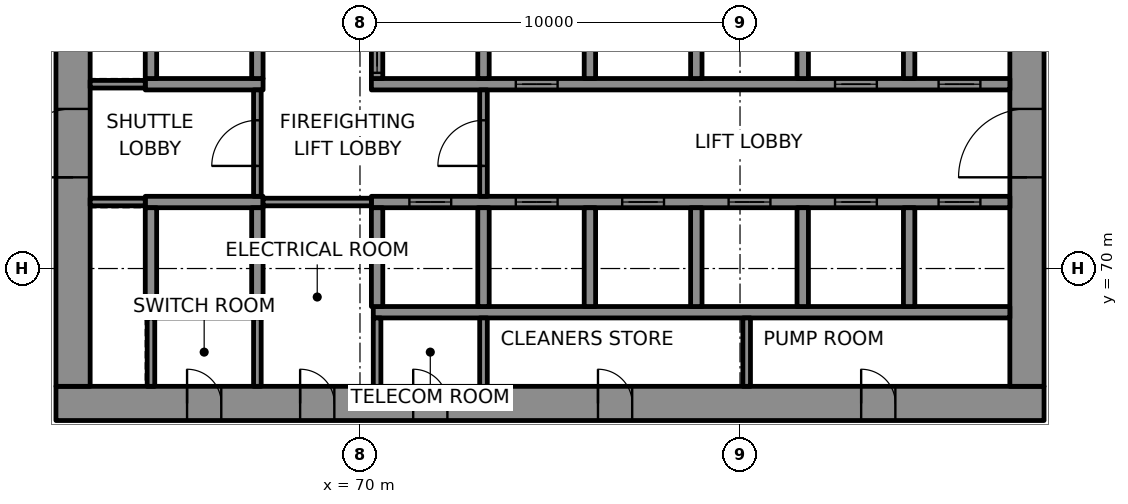
"""IFC4 building model, lengths in metres.
Left out: names, types, materials, properties, quantities, classifications, styles, units other than length and angle.
Written with IfcOpenShell. Run it as: python <this file> out.ifc"""

import sys

from ifc_helpers import new_model, si_unit, direction, frame, frame_2d, origin, place, context, subcontext, project, spatial, rectangle, extrude, element, fill, save


model = new_model("IFC4")
c1 = context("Model", 3, precision=1e-05, world=origin(), true_north=direction((0.0, 1.0)))
c2 = subcontext(c1, "Body", "Model", "MODEL_VIEW")
j1 = project(units=[si_unit("LENGTHUNIT", "METRE"), si_unit("PLANEANGLEUNIT", "RADIAN")], contexts=[c1])
p1 = place(None, origin())
s1 = spatial("IfcSite", under=j1, at=p1, CompositionType="ELEMENT")
p2 = place(p1, origin())
s2 = spatial("IfcBuilding", under=s1, at=p2, CompositionType="ELEMENT")
p3 = place(p2, frame((0.0, 0.0, 86.2)))
s3 = spatial("IfcBuildingStorey", under=s2, at=p3, CompositionType="ELEMENT", Elevation=86.2)
p4 = place(p3, frame((62.0, 66.45, 0.0), z_axis=(0.0, 0.0, 1.0), x_axis=(1.0, 0.0, 0.0)))
e1 = element("IfcWall", 1, at=p4, inside=s3, PredefinedType="SHEAR", context=c2, shape_type="SweptSolid", body=[
    extrude(rectangle(XDim=26.0, YDim=0.9, at=frame_2d((13.0, 0.0))), origin(), (0.0, 0.0, 1.0), 4.0),
])
p5 = place(p4, frame((3.45, 0.0, 0.0)))
e2 = element("IfcOpeningElement", 2, at=p5, cuts=e1, PredefinedType="OPENING", context=c2, shape_type="SweptSolid", body=[
    extrude(rectangle(XDim=0.9, YDim=2.1, at=frame_2d((0.45, 1.05))), frame((0.0, 0.46, 0.0), z_axis=(0.0, -1.0, 0.0), x_axis=(1.0, 0.0, 0.0)), (0.0, 0.0, 1.0), 0.92),
])
p6 = place(p4, frame((6.425, 0.0, 0.0)))
e3 = element("IfcOpeningElement", 3, at=p6, cuts=e1, PredefinedType="OPENING", context=c2, shape_type="SweptSolid", body=[
    extrude(rectangle(XDim=0.9, YDim=2.1, at=frame_2d((0.45, 1.05))), frame((0.0, 0.46, 0.0), z_axis=(0.0, -1.0, 0.0), x_axis=(1.0, 0.0, 0.0)), (0.0, 0.0, 1.0), 0.92),
])
p7 = place(p4, frame((9.4, 0.0, 0.0)))
e4 = element("IfcOpeningElement", 4, at=p7, cuts=e1, PredefinedType="OPENING", context=c2, shape_type="SweptSolid", body=[
    extrude(rectangle(XDim=0.9, YDim=2.1, at=frame_2d((0.45, 1.05))), frame((0.0, 0.46, 0.0), z_axis=(0.0, -1.0, 0.0), x_axis=(1.0, 0.0, 0.0)), (0.0, 0.0, 1.0), 0.92),
])
p8 = place(p4, frame((14.262, 0.0, 0.0)))
e5 = element("IfcOpeningElement", 5, at=p8, cuts=e1, PredefinedType="OPENING", context=c2, shape_type="SweptSolid", body=[
    extrude(rectangle(XDim=0.9, YDim=2.1, at=frame_2d((0.45, 1.05))), frame((0.0, 0.46, 0.0), z_axis=(0.0, -1.0, 0.0), x_axis=(1.0, 0.0, 0.0)), (0.0, 0.0, 1.0), 0.92),
])
p9 = place(p4, frame((21.188, 0.0, 0.0)))
e6 = element("IfcOpeningElement", 6, at=p9, cuts=e1, PredefinedType="OPENING", context=c2, shape_type="SweptSolid", body=[
    extrude(rectangle(XDim=0.9, YDim=2.1, at=frame_2d((0.45, 1.05))), frame((0.0, 0.46, 0.0), z_axis=(0.0, -1.0, 0.0), x_axis=(1.0, 0.0, 0.0)), (0.0, 0.0, 1.0), 0.92),
])
p10 = place(p3, frame((62.45, 66.9, 0.0), z_axis=(0.0, 0.0, 1.0), x_axis=(0.0, 1.0, 0.0)))
e7 = element("IfcWall", 7, at=p10, inside=s3, PredefinedType="SHEAR", context=c2, shape_type="SweptSolid", body=[
    extrude(rectangle(XDim=16.2, YDim=0.9, at=frame_2d((8.1, 0.0))), origin(), (0.0, 0.0, 1.0), 4.0),
])
p11 = place(p10, frame((5.5, 0.0, 0.0)))
e8 = element("IfcOpeningElement", 8, at=p11, cuts=e7, PredefinedType="OPENING", context=c2, shape_type="SweptSolid", body=[
    extrude(rectangle(XDim=1.8, YDim=2.1, at=frame_2d((0.9, 1.05))), frame((0.0, 0.46, 0.0), z_axis=(0.0, -1.0, 0.0), x_axis=(1.0, 0.0, 0.0)), (0.0, 0.0, 1.0), 0.92),
])
p12 = place(p3, frame((87.55, 66.9, 0.0), z_axis=(0.0, 0.0, 1.0), x_axis=(0.0, 1.0, 0.0)))
e9 = element("IfcWall", 9, at=p12, inside=s3, PredefinedType="SHEAR", context=c2, shape_type="SweptSolid", body=[
    extrude(rectangle(XDim=16.2, YDim=0.9, at=frame_2d((8.1, 0.0))), origin(), (0.0, 0.0, 1.0), 4.0),
])
p13 = place(p12, frame((5.5, 0.0, 0.0)))
e10 = element("IfcOpeningElement", 10, at=p13, cuts=e9, PredefinedType="OPENING", context=c2, shape_type="SweptSolid", body=[
    extrude(rectangle(XDim=1.8, YDim=2.1, at=frame_2d((0.9, 1.05))), frame((0.0, 0.46, 0.0), z_axis=(0.0, -1.0, 0.0), x_axis=(1.0, 0.0, 0.0)), (0.0, 0.0, 1.0), 0.92),
])
p14 = place(p12, frame((11.738, 0.0, 0.0)))
e11 = element("IfcOpeningElement", 11, at=p14, cuts=e9, PredefinedType="OPENING", context=c2, shape_type="SweptSolid", body=[
    extrude(rectangle(XDim=0.9, YDim=2.1, at=frame_2d((0.45, 1.05))), frame((0.0, 0.46, 0.0), z_axis=(0.0, -1.0, 0.0), x_axis=(1.0, 0.0, 0.0)), (0.0, 0.0, 1.0), 0.92),
])
p15 = place(p3, frame((64.35, 68.85, 0.0), z_axis=(0.0, 0.0, 1.0), x_axis=(1.0, 0.0, 0.0)))
e12 = element("IfcWall", 12, at=p15, inside=s3, PredefinedType="SHEAR", context=c2, shape_type="SweptSolid", body=[
    extrude(rectangle(XDim=3.1, YDim=0.3, at=frame_2d((1.55, 0.0))), origin(), (0.0, 0.0, 1.0), 4.0),
])
p16 = place(p3, frame((70.35, 68.85, 0.0), z_axis=(0.0, 0.0, 1.0), x_axis=(1.0, 0.0, 0.0)))
e13 = element("IfcWall", 13, at=p16, inside=s3, PredefinedType="SHEAR", context=c2, shape_type="SweptSolid", body=[
    extrude(rectangle(XDim=16.75, YDim=0.3, at=frame_2d((8.375, 0.0))), origin(), (0.0, 0.0, 1.0), 4.0),
])
p17 = place(p3, frame((64.35, 71.75, 0.0), z_axis=(0.0, 0.0, 1.0), x_axis=(1.0, 0.0, 0.0)))
e14 = element("IfcWall", 14, at=p17, inside=s3, PredefinedType="SHEAR", context=c2, shape_type="SweptSolid", body=[
    extrude(rectangle(XDim=3.1, YDim=0.3, at=frame_2d((1.55, 0.0))), origin(), (0.0, 0.0, 1.0), 4.0),
])
p18 = place(p3, frame((70.3, 71.75, 0.0), z_axis=(0.0, 0.0, 1.0), x_axis=(1.0, 0.0, 0.0)))
e15 = element("IfcWall", 15, at=p18, inside=s3, PredefinedType="SHEAR", context=c2, shape_type="SweptSolid", body=[
    extrude(rectangle(XDim=16.8, YDim=0.3, at=frame_2d((8.4, 0.0))), origin(), (0.0, 0.0, 1.0), 4.0),
])
p19 = place(p18, frame((1.0, 0.0, 0.0)))
e16 = element("IfcOpeningElement", 16, at=p19, cuts=e15, PredefinedType="OPENING", context=c2, shape_type="SweptSolid", body=[
    extrude(rectangle(XDim=1.1, YDim=2.1, at=frame_2d((0.55, 1.05))), frame((0.0, 0.16, 0.0), z_axis=(0.0, -1.0, 0.0), x_axis=(1.0, 0.0, 0.0)), (0.0, 0.0, 1.0), 0.32),
])
p20 = place(p18, frame((3.8, 0.0, 0.0)))
e17 = element("IfcOpeningElement", 17, at=p20, cuts=e15, PredefinedType="OPENING", context=c2, shape_type="SweptSolid", body=[
    extrude(rectangle(XDim=1.1, YDim=2.1, at=frame_2d((0.55, 1.05))), frame((0.0, 0.16, 0.0), z_axis=(0.0, -1.0, 0.0), x_axis=(1.0, 0.0, 0.0)), (0.0, 0.0, 1.0), 0.32),
])
p21 = place(p18, frame((6.6, 0.0, 0.0)))
e18 = element("IfcOpeningElement", 18, at=p21, cuts=e15, PredefinedType="OPENING", context=c2, shape_type="SweptSolid", body=[
    extrude(rectangle(XDim=1.1, YDim=2.1, at=frame_2d((0.55, 1.05))), frame((0.0, 0.16, 0.0), z_axis=(0.0, -1.0, 0.0), x_axis=(1.0, 0.0, 0.0)), (0.0, 0.0, 1.0), 0.32),
])
p22 = place(p18, frame((9.4, 0.0, 0.0)))
e19 = element("IfcOpeningElement", 19, at=p22, cuts=e15, PredefinedType="OPENING", context=c2, shape_type="SweptSolid", body=[
    extrude(rectangle(XDim=1.1, YDim=2.1, at=frame_2d((0.55, 1.05))), frame((0.0, 0.16, 0.0), z_axis=(0.0, -1.0, 0.0), x_axis=(1.0, 0.0, 0.0)), (0.0, 0.0, 1.0), 0.32),
])
p23 = place(p18, frame((12.2, 0.0, 0.0)))
e20 = element("IfcOpeningElement", 20, at=p23, cuts=e15, PredefinedType="OPENING", context=c2, shape_type="SweptSolid", body=[
    extrude(rectangle(XDim=1.1, YDim=2.1, at=frame_2d((0.55, 1.05))), frame((0.0, 0.16, 0.0), z_axis=(0.0, -1.0, 0.0), x_axis=(1.0, 0.0, 0.0)), (0.0, 0.0, 1.0), 0.32),
])
p24 = place(p18, frame((14.925, 0.0, 0.0)))
e21 = element("IfcOpeningElement", 21, at=p24, cuts=e15, PredefinedType="OPENING", context=c2, shape_type="SweptSolid", body=[
    extrude(rectangle(XDim=1.1, YDim=2.1, at=frame_2d((0.55, 1.05))), frame((0.0, 0.16, 0.0), z_axis=(0.0, -1.0, 0.0), x_axis=(1.0, 0.0, 0.0)), (0.0, 0.0, 1.0), 0.32),
])
p25 = place(p3, frame((64.35, 74.85, 0.0), z_axis=(0.0, 0.0, 1.0), x_axis=(1.0, 0.0, 0.0)))
e22 = element("IfcWall", 22, at=p25, inside=s3, PredefinedType="SHEAR", context=c2, shape_type="SweptSolid", body=[
    extrude(rectangle(XDim=3.1, YDim=0.3, at=frame_2d((1.55, 0.0))), origin(), (0.0, 0.0, 1.0), 4.0),
])
p26 = place(p3, frame((70.3, 74.85, 0.0), z_axis=(0.0, 0.0, 1.0), x_axis=(1.0, 0.0, 0.0)))
e23 = element("IfcWall", 23, at=p26, inside=s3, PredefinedType="SHEAR", context=c2, shape_type="SweptSolid", body=[
    extrude(rectangle(XDim=16.8, YDim=0.3, at=frame_2d((8.4, 0.0))), origin(), (0.0, 0.0, 1.0), 4.0),
])
p27 = place(p26, frame((3.8, 0.0, 0.0)))
e24 = element("IfcOpeningElement", 24, at=p27, cuts=e23, PredefinedType="OPENING", context=c2, shape_type="SweptSolid", body=[
    extrude(rectangle(XDim=1.1, YDim=2.1, at=frame_2d((0.55, 1.05))), frame((0.0, 0.16, 0.0), z_axis=(0.0, -1.0, 0.0), x_axis=(1.0, 0.0, 0.0)), (0.0, 0.0, 1.0), 0.32),
])
p28 = place(p26, frame((12.2, 0.0, 0.0)))
e25 = element("IfcOpeningElement", 25, at=p28, cuts=e23, PredefinedType="OPENING", context=c2, shape_type="SweptSolid", body=[
    extrude(rectangle(XDim=1.1, YDim=2.1, at=frame_2d((0.55, 1.05))), frame((0.0, 0.16, 0.0), z_axis=(0.0, -1.0, 0.0), x_axis=(1.0, 0.0, 0.0)), (0.0, 0.0, 1.0), 0.32),
])
p29 = place(p26, frame((14.925, 0.0, 0.0)))
e26 = element("IfcOpeningElement", 26, at=p29, cuts=e23, PredefinedType="OPENING", context=c2, shape_type="SweptSolid", body=[
    extrude(rectangle(XDim=1.1, YDim=2.1, at=frame_2d((0.55, 1.05))), frame((0.0, 0.16, 0.0), z_axis=(0.0, -1.0, 0.0), x_axis=(1.0, 0.0, 0.0)), (0.0, 0.0, 1.0), 0.32),
])
for number, where, z_axis, x_axis in (
    (27, (64.5, 69.0, 0.0), (0.0, 0.0, 1.0), (0.0, 1.0, 0.0)),
    (28, (64.5, 75.0, 0.0), (0.0, 0.0, 1.0), (0.0, 1.0, 0.0)),
    (29, (67.3, 69.0, 0.0), (0.0, 0.0, 1.0), (0.0, 1.0, 0.0)),
    (30, (67.3, 75.0, 0.0), (0.0, 0.0, 1.0), (0.0, 1.0, 0.0)),
    (31, (70.45, 69.0, 0.0), (0.0, 0.0, 1.0), (0.0, 1.0, 0.0)),
):
    element("IfcWall", number, at=place(p3, frame(where, z_axis=z_axis, x_axis=x_axis)), inside=s3, PredefinedType="SHEAR", context=c2, shape_type="SweptSolid", body=[
        extrude(rectangle(XDim=2.6, YDim=0.3, at=frame_2d((1.3, 0.0))), origin(), (0.0, 0.0, 1.0), 4.0),
    ])
p30 = place(p3, frame((70.45, 75.0, 0.0), z_axis=(0.0, 0.0, 1.0), x_axis=(0.0, 1.0, 0.0)))
e32 = element("IfcWall", 32, at=p30, inside=s3, PredefinedType="SHEAR", context=c2, shape_type="SweptSolid", body=[
    extrude(rectangle(XDim=2.6, YDim=0.3, at=frame_2d((1.3, 0.0))), origin(), (0.0, 0.0, 1.0), 4.0),
])
p31 = place(p30, frame((0.15, 0.0, 0.0)))
e33 = element("IfcOpeningElement", 33, at=p31, cuts=e32, PredefinedType="OPENING", context=c2, shape_type="SweptSolid", body=[
    extrude(rectangle(XDim=1.1, YDim=2.1, at=frame_2d((0.55, 1.05))), frame((0.0, 0.16, 0.0), z_axis=(0.0, -1.0, 0.0), x_axis=(1.0, 0.0, 0.0)), (0.0, 0.0, 1.0), 0.32),
])
for number, where, z_axis, x_axis in (
    (34, (73.25, 69.0, 0.0), (0.0, 0.0, 1.0), (0.0, 1.0, 0.0)),
    (35, (73.25, 75.0, 0.0), (0.0, 0.0, 1.0), (0.0, 1.0, 0.0)),
    (36, (76.05, 69.0, 0.0), (0.0, 0.0, 1.0), (0.0, 1.0, 0.0)),
    (37, (76.05, 75.0, 0.0), (0.0, 0.0, 1.0), (0.0, 1.0, 0.0)),
    (38, (78.85, 69.0, 0.0), (0.0, 0.0, 1.0), (0.0, 1.0, 0.0)),
    (39, (78.85, 75.0, 0.0), (0.0, 0.0, 1.0), (0.0, 1.0, 0.0)),
    (40, (81.65, 69.0, 0.0), (0.0, 0.0, 1.0), (0.0, 1.0, 0.0)),
    (41, (81.65, 75.0, 0.0), (0.0, 0.0, 1.0), (0.0, 1.0, 0.0)),
    (42, (84.45, 69.0, 0.0), (0.0, 0.0, 1.0), (0.0, 1.0, 0.0)),
    (43, (84.45, 75.0, 0.0), (0.0, 0.0, 1.0), (0.0, 1.0, 0.0)),
):
    element("IfcWall", number, at=place(p3, frame(where, z_axis=z_axis, x_axis=x_axis)), inside=s3, PredefinedType="SHEAR", context=c2, shape_type="SweptSolid", body=[
        extrude(rectangle(XDim=2.6, YDim=0.3, at=frame_2d((1.3, 0.0))), origin(), (0.0, 0.0, 1.0), 4.0),
    ])
p32 = place(p3, frame((62.9, 71.75, 0.0), z_axis=(0.0, 0.0, 1.0), x_axis=(1.0, 0.0, 0.0)))
e44 = element("IfcWall", 44, at=p32, inside=s3, PredefinedType="PARTITIONING", context=c2, shape_type="SweptSolid", body=[
    extrude(rectangle(XDim=1.45, YDim=0.2, at=frame_2d((0.725, 0.0))), origin(), (0.0, 0.0, 1.0), 4.0),
])
p33 = place(p3, frame((67.45, 71.75, 0.0), z_axis=(0.0, 0.0, 1.0), x_axis=(1.0, 0.0, 0.0)))
e45 = element("IfcWall", 45, at=p33, inside=s3, PredefinedType="PARTITIONING", context=c2, shape_type="SweptSolid", body=[
    extrude(rectangle(XDim=2.85, YDim=0.2, at=frame_2d((1.425, 0.0))), origin(), (0.0, 0.0, 1.0), 4.0),
])
p34 = place(p3, frame((62.9, 74.85, 0.0), z_axis=(0.0, 0.0, 1.0), x_axis=(1.0, 0.0, 0.0)))
e46 = element("IfcWall", 46, at=p34, inside=s3, PredefinedType="PARTITIONING", context=c2, shape_type="SweptSolid", body=[
    extrude(rectangle(XDim=1.45, YDim=0.2, at=frame_2d((0.725, 0.0))), origin(), (0.0, 0.0, 1.0), 4.0),
])
for number, where, z_axis, x_axis in (
    (47, (64.5, 66.9, 0.0), (0.0, 0.0, 1.0), (0.0, 1.0, 0.0)),
    (48, (67.3, 66.9, 0.0), (0.0, 0.0, 1.0), (0.0, 1.0, 0.0)),
):
    element("IfcWall", number, at=place(p3, frame(where, z_axis=z_axis, x_axis=x_axis)), inside=s3, PredefinedType="PARTITIONING", context=c2, shape_type="SweptSolid", body=[
        extrude(rectangle(XDim=1.8, YDim=0.2, at=frame_2d((0.9, 0.0))), origin(), (0.0, 0.0, 1.0), 4.0),
    ])
p35 = place(p3, frame((67.3, 71.9, 0.0), z_axis=(0.0, 0.0, 1.0), x_axis=(0.0, 1.0, 0.0)))
e49 = element("IfcWall", 49, at=p35, inside=s3, PredefinedType="PARTITIONING", context=c2, shape_type="SweptSolid", body=[
    extrude(rectangle(XDim=2.8, YDim=0.2, at=frame_2d((1.4, 0.0))), origin(), (0.0, 0.0, 1.0), 4.0),
])
p36 = place(p35, frame((0.8, 0.0, 0.0)))
e50 = element("IfcOpeningElement", 50, at=p36, cuts=e49, PredefinedType="OPENING", context=c2, shape_type="SweptSolid", body=[
    extrude(rectangle(XDim=1.2, YDim=2.1, at=frame_2d((0.6, 1.05))), frame((0.0, 0.11, 0.0), z_axis=(0.0, -1.0, 0.0), x_axis=(1.0, 0.0, 0.0)), (0.0, 0.0, 1.0), 0.22),
])
for number, where, z_axis, x_axis in (
    (51, (70.45, 66.9, 0.0), (0.0, 0.0, 1.0), (0.0, 1.0, 0.0)),
    (52, (73.25, 66.9, 0.0), (0.0, 0.0, 1.0), (0.0, 1.0, 0.0)),
):
    element("IfcWall", number, at=place(p3, frame(where, z_axis=z_axis, x_axis=x_axis)), inside=s3, PredefinedType="PARTITIONING", context=c2, shape_type="SweptSolid", body=[
        extrude(rectangle(XDim=1.8, YDim=0.2, at=frame_2d((0.9, 0.0))), origin(), (0.0, 0.0, 1.0), 4.0),
    ])
p37 = place(p3, frame((73.25, 71.9, 0.0), z_axis=(0.0, 0.0, 1.0), x_axis=(0.0, 1.0, 0.0)))
e53 = element("IfcWall", 53, at=p37, inside=s3, PredefinedType="PARTITIONING", context=c2, shape_type="SweptSolid", body=[
    extrude(rectangle(XDim=2.8, YDim=0.2, at=frame_2d((1.4, 0.0))), origin(), (0.0, 0.0, 1.0), 4.0),
])
p38 = place(p37, frame((0.8, 0.0, 0.0)))
e54 = element("IfcOpeningElement", 54, at=p38, cuts=e53, PredefinedType="OPENING", context=c2, shape_type="SweptSolid", body=[
    extrude(rectangle(XDim=1.2, YDim=2.1, at=frame_2d((0.6, 1.05))), frame((0.0, 0.11, 0.0), z_axis=(0.0, -1.0, 0.0), x_axis=(1.0, 0.0, 0.0)), (0.0, 0.0, 1.0), 0.22),
])
p39 = place(p3, frame((80.175, 66.9, 0.0), z_axis=(0.0, 0.0, 1.0), x_axis=(0.0, 1.0, 0.0)))
e55 = element("IfcWall", 55, at=p39, inside=s3, PredefinedType="PARTITIONING", context=c2, shape_type="SweptSolid", body=[
    extrude(rectangle(XDim=1.8, YDim=0.2, at=frame_2d((0.9, 0.0))), origin(), (0.0, 0.0, 1.0), 4.0),
])
p40 = place(p19, origin())
e56 = element("IfcDoor", 56, at=p40, inside=s3, OperationType="DOUBLE_DOOR_SLIDING", PredefinedType="DOOR", context=c2, shape_type="SweptSolid", body=[
    extrude(rectangle(XDim=1.1, YDim=2.1, at=frame_2d((0.55, 1.05))), frame((0.0, 0.025, 0.0), z_axis=(0.0, -1.0, 0.0), x_axis=(1.0, 0.0, 0.0)), (0.0, 0.0, 1.0), 0.05),
])
fill(e16, e56)
p41 = place(p20, origin())
e57 = element("IfcDoor", 57, at=p41, inside=s3, OperationType="DOUBLE_DOOR_SLIDING", PredefinedType="DOOR", context=c2, shape_type="SweptSolid", body=[
    extrude(rectangle(XDim=1.1, YDim=2.1, at=frame_2d((0.55, 1.05))), frame((0.0, 0.025, 0.0), z_axis=(0.0, -1.0, 0.0), x_axis=(1.0, 0.0, 0.0)), (0.0, 0.0, 1.0), 0.05),
])
fill(e17, e57)
p42 = place(p21, origin())
e58 = element("IfcDoor", 58, at=p42, inside=s3, OperationType="DOUBLE_DOOR_SLIDING", PredefinedType="DOOR", context=c2, shape_type="SweptSolid", body=[
    extrude(rectangle(XDim=1.1, YDim=2.1, at=frame_2d((0.55, 1.05))), frame((0.0, 0.025, 0.0), z_axis=(0.0, -1.0, 0.0), x_axis=(1.0, 0.0, 0.0)), (0.0, 0.0, 1.0), 0.05),
])
fill(e18, e58)
p43 = place(p22, origin())
e59 = element("IfcDoor", 59, at=p43, inside=s3, OperationType="DOUBLE_DOOR_SLIDING", PredefinedType="DOOR", context=c2, shape_type="SweptSolid", body=[
    extrude(rectangle(XDim=1.1, YDim=2.1, at=frame_2d((0.55, 1.05))), frame((0.0, 0.025, 0.0), z_axis=(0.0, -1.0, 0.0), x_axis=(1.0, 0.0, 0.0)), (0.0, 0.0, 1.0), 0.05),
])
fill(e19, e59)
p44 = place(p23, origin())
e60 = element("IfcDoor", 60, at=p44, inside=s3, OperationType="DOUBLE_DOOR_SLIDING", PredefinedType="DOOR", context=c2, shape_type="SweptSolid", body=[
    extrude(rectangle(XDim=1.1, YDim=2.1, at=frame_2d((0.55, 1.05))), frame((0.0, 0.025, 0.0), z_axis=(0.0, -1.0, 0.0), x_axis=(1.0, 0.0, 0.0)), (0.0, 0.0, 1.0), 0.05),
])
fill(e20, e60)
p45 = place(p24, origin())
e61 = element("IfcDoor", 61, at=p45, inside=s3, OperationType="DOUBLE_DOOR_SLIDING", PredefinedType="DOOR", context=c2, shape_type="SweptSolid", body=[
    extrude(rectangle(XDim=1.1, YDim=2.1, at=frame_2d((0.55, 1.05))), frame((0.0, 0.025, 0.0), z_axis=(0.0, -1.0, 0.0), x_axis=(1.0, 0.0, 0.0)), (0.0, 0.0, 1.0), 0.05),
])
fill(e21, e61)
p46 = place(p31, origin())
e62 = element("IfcDoor", 62, at=p46, inside=s3, OperationType="DOUBLE_DOOR_SLIDING", PredefinedType="DOOR", context=c2, shape_type="SweptSolid", body=[
    extrude(rectangle(XDim=1.1, YDim=2.1, at=frame_2d((0.55, 1.05))), frame((0.0, 0.025, 0.0), z_axis=(0.0, -1.0, 0.0), x_axis=(1.0, 0.0, 0.0)), (0.0, 0.0, 1.0), 0.05),
])
fill(e33, e62)
p47 = place(p27, origin())
e63 = element("IfcDoor", 63, at=p47, inside=s3, OperationType="DOUBLE_DOOR_SLIDING", PredefinedType="DOOR", context=c2, shape_type="SweptSolid", body=[
    extrude(rectangle(XDim=1.1, YDim=2.1, at=frame_2d((0.55, 1.05))), frame((0.0, 0.025, 0.0), z_axis=(0.0, -1.0, 0.0), x_axis=(1.0, 0.0, 0.0)), (0.0, 0.0, 1.0), 0.05),
])
fill(e24, e63)
p48 = place(p28, origin())
e64 = element("IfcDoor", 64, at=p48, inside=s3, OperationType="DOUBLE_DOOR_SLIDING", PredefinedType="DOOR", context=c2, shape_type="SweptSolid", body=[
    extrude(rectangle(XDim=1.1, YDim=2.1, at=frame_2d((0.55, 1.05))), frame((0.0, 0.025, 0.0), z_axis=(0.0, -1.0, 0.0), x_axis=(1.0, 0.0, 0.0)), (0.0, 0.0, 1.0), 0.05),
])
fill(e25, e64)
p49 = place(p29, origin())
e65 = element("IfcDoor", 65, at=p49, inside=s3, OperationType="DOUBLE_DOOR_SLIDING", PredefinedType="DOOR", context=c2, shape_type="SweptSolid", body=[
    extrude(rectangle(XDim=1.1, YDim=2.1, at=frame_2d((0.55, 1.05))), frame((0.0, 0.025, 0.0), z_axis=(0.0, -1.0, 0.0), x_axis=(1.0, 0.0, 0.0)), (0.0, 0.0, 1.0), 0.05),
])
fill(e26, e65)
p50 = place(p38, origin())
e66 = element("IfcDoor", 66, at=p50, inside=s3, OperationType="SINGLE_SWING_LEFT", PredefinedType="DOOR", context=c2, shape_type="SweptSolid", body=[
    extrude(rectangle(XDim=1.2, YDim=2.1, at=frame_2d((0.6, 1.05))), frame((0.0, 0.025, 0.0), z_axis=(0.0, -1.0, 0.0), x_axis=(1.0, 0.0, 0.0)), (0.0, 0.0, 1.0), 0.05),
])
fill(e54, e66)
p51 = place(p36, origin())
e67 = element("IfcDoor", 67, at=p51, inside=s3, OperationType="SINGLE_SWING_RIGHT", PredefinedType="DOOR", context=c2, shape_type="SweptSolid", body=[
    extrude(rectangle(XDim=1.2, YDim=2.1, at=frame_2d((0.6, 1.05))), frame((0.0, 0.025, 0.0), z_axis=(0.0, -1.0, 0.0), x_axis=(1.0, 0.0, 0.0)), (0.0, 0.0, 1.0), 0.05),
])
fill(e50, e67)
p52 = place(p11, origin())
e68 = element("IfcDoor", 68, at=p52, inside=s3, OperationType="SINGLE_SWING_LEFT", PredefinedType="DOOR", context=c2, shape_type="SweptSolid", body=[
    extrude(rectangle(XDim=1.8, YDim=2.1, at=frame_2d((0.9, 1.05))), frame((0.0, 0.17, 0.0), z_axis=(0.0, -1.0, 0.0), x_axis=(1.0, 0.0, 0.0)), (0.0, 0.0, 1.0), 0.34),
])
fill(e8, e68)
p53 = place(p13, origin())
e69 = element("IfcDoor", 69, at=p53, inside=s3, OperationType="SINGLE_SWING_RIGHT", PredefinedType="DOOR", context=c2, shape_type="SweptSolid", body=[
    extrude(rectangle(XDim=1.8, YDim=2.1, at=frame_2d((0.9, 1.05))), frame((0.0, 0.17, 0.0), z_axis=(0.0, -1.0, 0.0), x_axis=(1.0, 0.0, 0.0)), (0.0, 0.0, 1.0), 0.34),
])
fill(e10, e69)
p54 = place(p5, origin())
e70 = element("IfcDoor", 70, at=p54, inside=s3, OperationType="SINGLE_SWING_LEFT", PredefinedType="DOOR", context=c2, shape_type="SweptSolid", body=[
    extrude(rectangle(XDim=0.9, YDim=2.1, at=frame_2d((0.45, 1.05))), frame((0.0, 0.17, 0.0), z_axis=(0.0, -1.0, 0.0), x_axis=(1.0, 0.0, 0.0)), (0.0, 0.0, 1.0), 0.34),
])
fill(e2, e70)
p55 = place(p6, origin())
e71 = element("IfcDoor", 71, at=p55, inside=s3, OperationType="SINGLE_SWING_RIGHT", PredefinedType="DOOR", context=c2, shape_type="SweptSolid", body=[
    extrude(rectangle(XDim=0.9, YDim=2.1, at=frame_2d((0.45, 1.05))), frame((0.0, 0.17, 0.0), z_axis=(0.0, -1.0, 0.0), x_axis=(1.0, 0.0, 0.0)), (0.0, 0.0, 1.0), 0.34),
])
fill(e3, e71)
p56 = place(p7, origin())
e72 = element("IfcDoor", 72, at=p56, inside=s3, OperationType="SINGLE_SWING_LEFT", PredefinedType="DOOR", context=c2, shape_type="SweptSolid", body=[
    extrude(rectangle(XDim=0.9, YDim=2.1, at=frame_2d((0.45, 1.05))), frame((0.0, 0.17, 0.0), z_axis=(0.0, -1.0, 0.0), x_axis=(1.0, 0.0, 0.0)), (0.0, 0.0, 1.0), 0.34),
])
fill(e4, e72)
p57 = place(p8, origin())
e73 = element("IfcDoor", 73, at=p57, inside=s3, OperationType="SINGLE_SWING_RIGHT", PredefinedType="DOOR", context=c2, shape_type="SweptSolid", body=[
    extrude(rectangle(XDim=0.9, YDim=2.1, at=frame_2d((0.45, 1.05))), frame((0.0, 0.17, 0.0), z_axis=(0.0, -1.0, 0.0), x_axis=(1.0, 0.0, 0.0)), (0.0, 0.0, 1.0), 0.34),
])
fill(e5, e73)
p58 = place(p9, origin())
e74 = element("IfcDoor", 74, at=p58, inside=s3, OperationType="SINGLE_SWING_LEFT", PredefinedType="DOOR", context=c2, shape_type="SweptSolid", body=[
    extrude(rectangle(XDim=0.9, YDim=2.1, at=frame_2d((0.45, 1.05))), frame((0.0, 0.17, 0.0), z_axis=(0.0, -1.0, 0.0), x_axis=(1.0, 0.0, 0.0)), (0.0, 0.0, 1.0), 0.34),
])
fill(e6, e74)
save(model, sys.argv[1])
